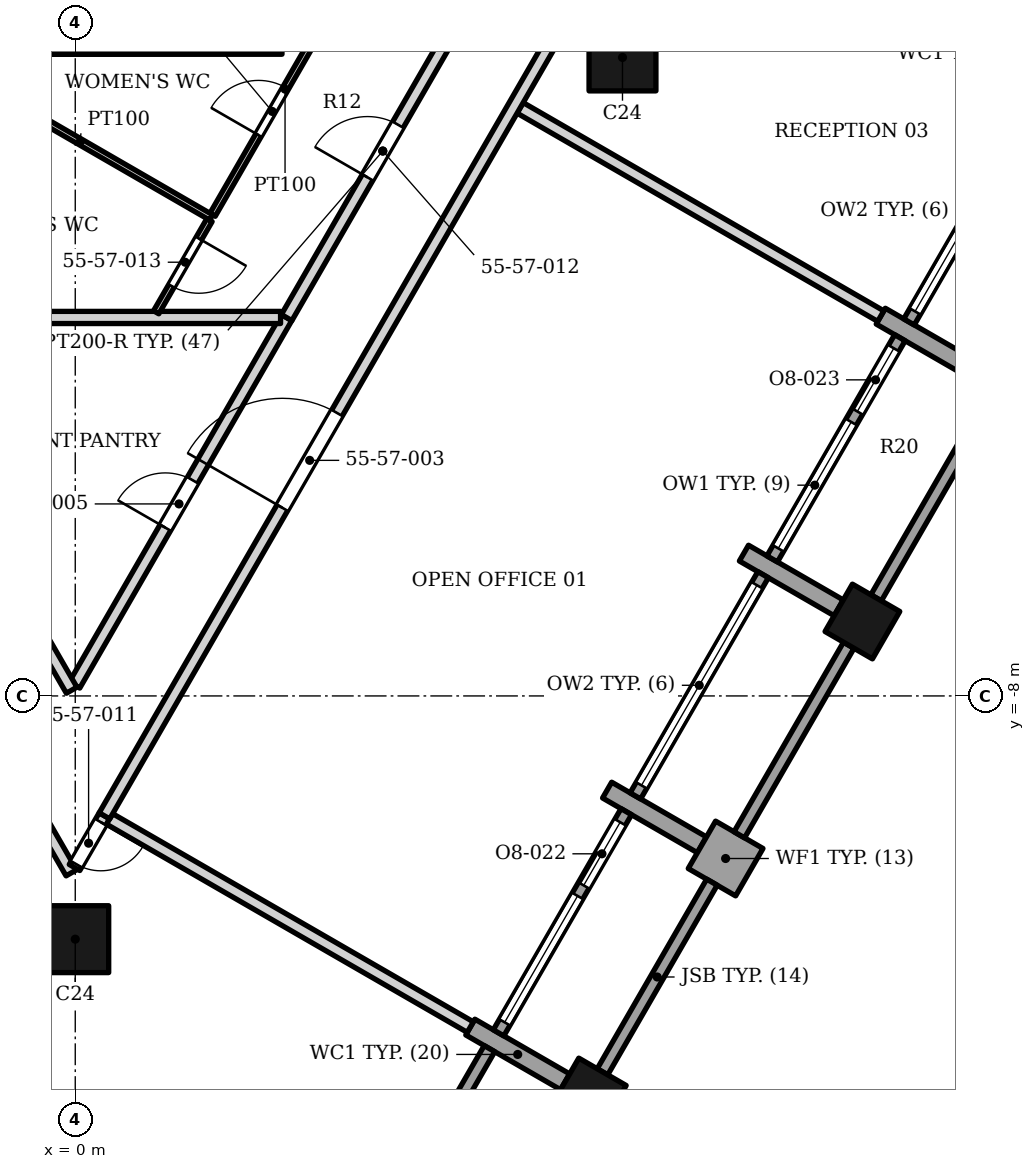
"""IFC4 building model, lengths in metres.
Left out: names, types, materials, properties, quantities, classifications, styles, units other than length and angle.
Written with IfcOpenShell. Run it as: python <this file> out.ifc"""

import sys

from ifc_helpers import new_model, si_unit, direction, frame, frame_2d, origin, origin_2d, place, context, subcontext, project, spatial, rectangle, extrude, element, fill, save


model = new_model("IFC4")
c1 = context("Model", 3, precision=1e-05, world=origin(), true_north=direction((0.0, 1.0)))
c2 = subcontext(c1, "Body", "Model", "MODEL_VIEW")
j1 = project(units=[si_unit("LENGTHUNIT", "METRE"), si_unit("PLANEANGLEUNIT", "RADIAN")], contexts=[c1])
p1 = place(None, origin())
s1 = spatial("IfcSite", under=j1, at=p1, CompositionType="ELEMENT")
p2 = place(p1, origin())
s2 = spatial("IfcBuilding", under=s1, at=p2, CompositionType="ELEMENT")
p3 = place(p2, frame((0.0, 0.0, 231.5)))
s3 = spatial("IfcBuildingStorey", under=s2, at=p3, CompositionType="ELEMENT", Elevation=231.5)
for number, where, z_axis, x_axis in (
    (1, (9.0, 2.5, 0.0), (0.0, 0.0, 1.0), (1.0, 0.0, 0.0)),
    (2, (0.0, -12.0, 0.0), (0.0, 0.0, 1.0), (1.0, 0.0, 0.0)),
):
    element("IfcColumn", number, at=place(p3, frame(where, z_axis=z_axis, x_axis=x_axis)), inside=s3, PredefinedType="COLUMN", context=c2, shape_type="SweptSolid", body=[
        extrude(rectangle(XDim=1.1, YDim=1.1, at=origin_2d()), origin(), (0.0, 0.0, 1.0), 3.9),
    ])
for number, where, z_axis, x_axis in (
    (3, (8.446, -14.571, 0.0), (0.0, 0.0, 1.0), (0.5, 0.866, 0.0)),
    (4, (12.946, -6.776, 0.0), (0.0, 0.0, 1.0), (0.5, 0.866, 0.0)),
):
    element("IfcColumn", number, at=place(p3, frame(where, z_axis=z_axis, x_axis=x_axis)), inside=s3, PredefinedType="COLUMN", context=c2, shape_type="SweptSolid", body=[
        extrude(rectangle(XDim=0.9, YDim=0.9, at=origin_2d()), origin(), (0.0, 0.0, 1.0), 3.9),
    ])
p4 = place(p3, frame((8.056, -14.345, 0.0), z_axis=(0.0, 0.0, 1.0), x_axis=(-0.866047807691, 0.499961193289, 0.0)))
e5 = element("IfcWall", 5, at=p4, inside=s3, PredefinedType="SOLIDWALL", context=c2, shape_type="SweptSolid", body=[
    extrude(rectangle(XDim=1.8, YDim=0.3, at=frame_2d((0.9, 0.0))), origin(), (0.0, 0.0, 1.0), 3.0),
])
p5 = place(p3, frame((10.921, -10.284, 0.0), z_axis=(0.0, 0.0, 1.0), x_axis=(-0.499902469156, -0.866081705922, 0.0)))
e6 = element("IfcWall", 6, at=p5, inside=s3, PredefinedType="SOLIDWALL", context=c2, shape_type="SweptSolid", body=[
    extrude(rectangle(XDim=0.9, YDim=0.9, at=frame_2d((0.45, 0.0))), origin(), (0.0, 0.0, 1.0), 3.0),
])
p6 = place(p3, frame((8.748, -9.548, 0.0), z_axis=(0.0, 0.0, 1.0), x_axis=(0.865989075817, -0.500062916607, 0.0)))
e7 = element("IfcWall", 7, at=p6, inside=s3, PredefinedType="SOLIDWALL", context=c2, shape_type="SweptSolid", body=[
    extrude(rectangle(XDim=1.8, YDim=0.3, at=frame_2d((0.9, 0.0))), origin(), (0.0, 0.0, 1.0), 2.884),
])
p7 = place(p3, frame((12.556, -6.551, 0.0), z_axis=(0.0, 0.0, 1.0), x_axis=(-0.866013897511, 0.50001992892, 0.0)))
e8 = element("IfcWall", 8, at=p7, inside=s3, PredefinedType="SOLIDWALL", context=c2, shape_type="SweptSolid", body=[
    extrude(rectangle(XDim=1.8, YDim=0.3, at=frame_2d((0.9, 0.0))), origin(), (0.0, 0.0, 1.0), 2.884),
])
p8 = place(p3, frame((13.248, -1.754, 0.0), z_axis=(0.0, 0.0, 1.0), x_axis=(0.865989075817, -0.500062916607, 0.0)))
e9 = element("IfcWall", 9, at=p8, inside=s3, PredefinedType="SOLIDWALL", context=c2, shape_type="SweptSolid", body=[
    extrude(rectangle(XDim=1.8, YDim=0.3, at=frame_2d((0.9, 0.0))), origin(), (0.0, 0.0, 1.0), 3.0),
])
p9 = place(p3, frame((4.712, -17.438, 0.0), z_axis=(0.0, 0.0, 1.0), x_axis=(0.500027713859, 0.866009402589, 0.0)))
e10 = element("IfcWall", 10, at=p9, inside=s3, PredefinedType="ELEMENTEDWALL", context=c2, shape_type="SweptSolid", body=[
    extrude(rectangle(XDim=4.2, YDim=0.2, at=frame_2d((2.1, 0.0))), origin(), (0.0, 0.0, 1.0), 3.0),
])
p10 = place(p3, frame((8.671, -14.181, 0.0), z_axis=(0.0, 0.0, 1.0), x_axis=(0.500012057535, 0.866018442252, 0.0)))
e11 = element("IfcWall", 11, at=p10, inside=s3, PredefinedType="SOLIDWALL", context=c2, shape_type="SweptSolid", body=[
    extrude(rectangle(XDim=3.6, YDim=0.2, at=frame_2d((1.8, 0.0))), origin(), (0.0, 0.0, 1.0), 2.95),
])
p11 = place(p3, frame((6.962, -13.541, 0.0), z_axis=(0.0, 0.0, 1.0), x_axis=(0.500027713859, 0.866009402589, 0.0)))
e12 = element("IfcWall", 12, at=p11, inside=s3, PredefinedType="ELEMENTEDWALL", context=c2, shape_type="SweptSolid", body=[
    extrude(rectangle(XDim=4.2, YDim=0.2, at=frame_2d((2.1, 0.0))), origin(), (0.0, 0.0, 1.0), 2.884),
])
p12 = place(p11, frame((0.2, 0.0, 0.45)))
e13 = element("IfcOpeningElement", 13, at=p12, cuts=e12, PredefinedType="OPENING", context=c2, shape_type="SweptSolid", body=[
    extrude(rectangle(XDim=2.4, YDim=2.25, at=frame_2d((1.2, 1.125))), frame((0.0, 0.11, 0.0), z_axis=(0.0, -1.0, 0.0), x_axis=(1.0, 0.0, 0.0)), (0.0, 0.0, 1.0), 0.22),
])
p13 = place(p11, frame((2.8, 0.0, 0.0)))
e14 = element("IfcOpeningElement", 14, at=p13, cuts=e12, PredefinedType="OPENING", context=c2, shape_type="SweptSolid", body=[
    extrude(rectangle(XDim=1.2, YDim=2.7, at=frame_2d((0.6, 1.35))), frame((0.0, 0.11, 0.0), z_axis=(0.0, -1.0, 0.0), x_axis=(1.0, 0.0, 0.0)), (0.0, 0.0, 1.0), 0.22),
])
p14 = place(p3, frame((10.921, -10.284, 0.0), z_axis=(0.0, 0.0, 1.0), x_axis=(0.500012057535, 0.866018442252, 0.0)))
e15 = element("IfcWall", 15, at=p14, inside=s3, PredefinedType="SOLIDWALL", context=c2, shape_type="SweptSolid", body=[
    extrude(rectangle(XDim=3.6, YDim=0.2, at=frame_2d((1.8, 0.0))), origin(), (0.0, 0.0, 1.0), 3.0),
])
p15 = place(p3, frame((9.212, -9.644, 0.0), z_axis=(0.0, 0.0, 1.0), x_axis=(0.500027713859, 0.866009402589, 0.0)))
e16 = element("IfcWall", 16, at=p15, inside=s3, PredefinedType="ELEMENTEDWALL", context=c2, shape_type="SweptSolid", body=[
    extrude(rectangle(XDim=4.2, YDim=0.2, at=frame_2d((2.1, 0.0))), origin(), (0.0, 0.0, 1.0), 2.884),
])
p16 = place(p15, frame((0.2, 0.0, 0.45)))
e17 = element("IfcOpeningElement", 17, at=p16, cuts=e16, PredefinedType="OPENING", context=c2, shape_type="SweptSolid", body=[
    extrude(rectangle(XDim=3.8, YDim=2.25, at=frame_2d((1.9, 1.125))), frame((0.0, 0.11, 0.0), z_axis=(0.0, -1.0, 0.0), x_axis=(1.0, 0.0, 0.0)), (0.0, 0.0, 1.0), 0.22),
])
p17 = place(p3, frame((13.171, -6.387, 0.0), z_axis=(0.0, 0.0, 1.0), x_axis=(0.500012057535, 0.866018442252, 0.0)))
e18 = element("IfcWall", 18, at=p17, inside=s3, PredefinedType="SOLIDWALL", context=c2, shape_type="SweptSolid", body=[
    extrude(rectangle(XDim=3.6, YDim=0.2, at=frame_2d((1.8, 0.0))), origin(), (0.0, 0.0, 1.0), 3.0),
])
p18 = place(p3, frame((11.462, -5.746, 0.0), z_axis=(0.0, 0.0, 1.0), x_axis=(0.500027713859, 0.866009402589, 0.0)))
e19 = element("IfcWall", 19, at=p18, inside=s3, PredefinedType="ELEMENTEDWALL", context=c2, shape_type="SweptSolid", body=[
    extrude(rectangle(XDim=4.2, YDim=0.2, at=frame_2d((2.1, 0.0))), origin(), (0.0, 0.0, 1.0), 2.884),
])
p19 = place(p18, frame((0.2, 0.0, 0.45)))
e20 = element("IfcOpeningElement", 20, at=p19, cuts=e19, PredefinedType="OPENING", context=c2, shape_type="SweptSolid", body=[
    extrude(rectangle(XDim=2.4, YDim=2.25, at=frame_2d((1.2, 1.125))), frame((0.0, 0.11, 0.0), z_axis=(0.0, -1.0, 0.0), x_axis=(1.0, 0.0, 0.0)), (0.0, 0.0, 1.0), 0.22),
])
p20 = place(p18, frame((2.8, 0.0, 0.0)))
e21 = element("IfcOpeningElement", 21, at=p20, cuts=e19, PredefinedType="OPENING", context=c2, shape_type="SweptSolid", body=[
    extrude(rectangle(XDim=1.2, YDim=2.7, at=frame_2d((0.6, 1.35))), frame((0.0, 0.11, 0.0), z_axis=(0.0, -1.0, 0.0), x_axis=(1.0, 0.0, 0.0)), (0.0, 0.0, 1.0), 0.22),
])
p21 = place(p3, frame((13.712, -1.849, 0.0), z_axis=(0.0, 0.0, 1.0), x_axis=(0.500002543286, 0.866023935413, 0.0)))
e22 = element("IfcWall", 22, at=p21, inside=s3, PredefinedType="ELEMENTEDWALL", context=c2, shape_type="SweptSolid", body=[
    extrude(rectangle(XDim=4.2, YDim=0.2, at=frame_2d((2.1, 0.0))), origin(), (0.0, 0.0, 1.0), 3.0),
])
p22 = place(p21, frame((0.2, 0.0, 0.45)))
e23 = element("IfcOpeningElement", 23, at=p22, cuts=e22, PredefinedType="OPENING", context=c2, shape_type="SweptSolid", body=[
    extrude(rectangle(XDim=3.8, YDim=2.25, at=frame_2d((1.9, 1.125))), frame((0.0, 0.11, 0.0), z_axis=(0.0, -1.0, 0.0), x_axis=(1.0, 0.0, 0.0)), (0.0, 0.0, 1.0), 0.22),
])
p23 = place(p3, frame((-8.403, 3.534, 0.0), z_axis=(0.0, 0.0, 1.0), x_axis=(0.499994899308, -0.86602834865, 0.0)))
e24 = element("IfcWall", 24, at=p23, inside=s3, PredefinedType="PARTITIONING", context=c2, shape_type="SweptSolid", body=[
    extrude(rectangle(XDim=16.677, YDim=0.2, at=frame_2d((8.339, 0.0))), origin(), (0.0, 0.0, 1.0), 2.742),
])
p24 = place(p23, frame((6.084, 0.0, 0.0)))
e25 = element("IfcOpeningElement", 25, at=p24, cuts=e24, PredefinedType="OPENING", context=c2, shape_type="SweptSolid", body=[
    extrude(rectangle(XDim=1.8, YDim=2.4, at=frame_2d((0.9, 1.2))), frame((0.0, 0.11, 0.0), z_axis=(0.0, -1.0, 0.0), x_axis=(1.0, 0.0, 0.0)), (0.0, 0.0, 1.0), 0.22),
])
p25 = place(p23, frame((13.285, 0.0, 0.0)))
e26 = element("IfcOpeningElement", 26, at=p25, cuts=e24, PredefinedType="OPENING", context=c2, shape_type="SweptSolid", body=[
    extrude(rectangle(XDim=0.9, YDim=2.1, at=frame_2d((0.45, 1.05))), frame((0.0, 0.11, 0.0), z_axis=(0.0, -1.0, 0.0), x_axis=(1.0, 0.0, 0.0)), (0.0, 0.0, 1.0), 0.22),
])
p26 = place(p23, frame((1.364, 0.0, 0.0)))
e27 = element("IfcOpeningElement", 27, at=p26, cuts=e24, PredefinedType="OPENING", context=c2, shape_type="SweptSolid", body=[
    extrude(rectangle(XDim=0.9, YDim=2.1, at=frame_2d((0.45, 1.05))), frame((0.0, 0.11, 0.0), z_axis=(0.0, -1.0, 0.0), x_axis=(1.0, 0.0, 0.0)), (0.0, 0.0, 1.0), 0.22),
])
p27 = place(p3, frame((-0.012, -10.822, 0.0), z_axis=(0.0, 0.0, 1.0), x_axis=(0.501271486133, 0.865290065348, 0.0)))
e28 = element("IfcWall", 28, at=p27, inside=s3, PredefinedType="PARTITIONING", context=c2, shape_type="SweptSolid", body=[
    extrude(rectangle(XDim=0.982, YDim=0.2, at=frame_2d((0.491, 0.0))), origin(), (0.0, 0.0, 1.0), 2.742),
])
p28 = place(p27, frame((0.062, 0.0, 0.0)))
e29 = element("IfcOpeningElement", 29, at=p28, cuts=e28, PredefinedType="OPENING", context=c2, shape_type="SweptSolid", body=[
    extrude(rectangle(XDim=0.8, YDim=2.1, at=frame_2d((0.4, 1.05))), frame((0.0, 0.11, 0.0), z_axis=(0.0, -1.0, 0.0), x_axis=(1.0, 0.0, 0.0)), (0.0, 0.0, 1.0), 0.22),
])
p29 = place(p3, frame((0.565, -10.022, 0.0), z_axis=(0.0, 0.0, 1.0), x_axis=(0.866127427728, -0.499823247696, 0.0)))
e30 = element("IfcWall", 30, at=p29, inside=s3, PredefinedType="PARTITIONING", context=c2, shape_type="SweptSolid", body=[
    extrude(rectangle(XDim=6.85, YDim=0.2, at=frame_2d((3.425, 0.0))), origin(), (0.0, 0.0, 1.0), 2.742),
])
p30 = place(p3, frame((-0.013, -7.821, 0.0), z_axis=(0.0, 0.0, 1.0), x_axis=(0.499774962009, 0.866155290551, 0.0)))
e31 = element("IfcWall", 31, at=p30, inside=s3, PredefinedType="PARTITIONING", context=c2, shape_type="SweptSolid", body=[
    extrude(rectangle(XDim=6.977, YDim=0.2, at=frame_2d((3.488, 0.0))), origin(), (0.0, 0.0, 1.0), 2.742),
])
p31 = place(p30, frame((2.989, 0.0, 0.0)))
e32 = element("IfcOpeningElement", 32, at=p31, cuts=e31, PredefinedType="OPENING", context=c2, shape_type="SweptSolid", body=[
    extrude(rectangle(XDim=0.9, YDim=2.1, at=frame_2d((0.45, 1.05))), frame((0.0, 0.11, 0.0), z_axis=(0.0, -1.0, 0.0), x_axis=(1.0, 0.0, 0.0)), (0.0, 0.0, 1.0), 0.22),
])
p32 = place(p3, frame((-2.071, -1.776, 0.0), z_axis=(0.0, 0.0, 1.0), x_axis=(1.0, 0.0, 0.0)))
e33 = element("IfcWall", 33, at=p32, inside=s3, PredefinedType="PARTITIONING", context=c2, shape_type="SweptSolid", body=[
    extrude(rectangle(XDim=5.448, YDim=0.2, at=frame_2d((2.724, 0.0))), origin(), (0.0, 0.0, 1.0), 2.742),
])
p33 = place(p3, frame((3.476, -1.778, 0.0), z_axis=(0.0, 0.0, 1.0), x_axis=(0.500016482634, 0.866015887322, 0.0)))
e34 = element("IfcWall", 34, at=p33, inside=s3, PredefinedType="PARTITIONING", context=c2, shape_type="SweptSolid", body=[
    extrude(rectangle(XDim=6.325, YDim=0.2, at=frame_2d((3.163, 0.0))), origin(), (0.0, 0.0, 1.0), 2.742),
])
p34 = place(p33, frame((2.663, 0.0, 0.0)))
e35 = element("IfcOpeningElement", 35, at=p34, cuts=e34, PredefinedType="OPENING", context=c2, shape_type="SweptSolid", body=[
    extrude(rectangle(XDim=1.0, YDim=2.1, at=frame_2d((0.5, 1.05))), frame((0.0, 0.11, 0.0), z_axis=(0.0, -1.0, 0.0), x_axis=(1.0, 0.0, 0.0)), (0.0, 0.0, 1.0), 0.22),
])
p35 = place(p3, frame((7.316, 1.671, 0.0), z_axis=(0.0, 0.0, 1.0), x_axis=(0.866023543838, -0.500003221507, 0.0)))
e36 = element("IfcWall", 36, at=p35, inside=s3, PredefinedType="PARTITIONING", context=c2, shape_type="SweptSolid", body=[
    extrude(rectangle(XDim=6.85, YDim=0.2, at=frame_2d((3.425, 0.0))), origin(), (0.0, 0.0, 1.0), 2.884),
])
p36 = place(p3, frame((1.331, -1.691, 0.0), z_axis=(0.0, 0.0, 1.0), x_axis=(0.500723196883, 0.865607463059, 0.0)))
e37 = element("IfcWall", 37, at=p36, inside=s3, PredefinedType="PARTITIONING", context=c2, shape_type="SweptSolid", body=[
    extrude(rectangle(XDim=1.752, YDim=0.1, at=frame_2d((0.876, 0.0))), origin(), (0.0, 0.0, 1.0), 2.742),
])
p37 = place(p36, frame((0.502, 0.0, 0.0)))
e38 = element("IfcOpeningElement", 38, at=p37, cuts=e37, PredefinedType="OPENING", context=c2, shape_type="SweptSolid", body=[
    extrude(rectangle(XDim=0.9, YDim=2.1, at=frame_2d((0.45, 1.05))), frame((0.0, 0.06, 0.0), z_axis=(0.0, -1.0, 0.0), x_axis=(1.0, 0.0, 0.0)), (0.0, 0.0, 1.0), 0.12),
])
p38 = place(p3, frame((2.258, -0.087, 0.0), z_axis=(0.0, 0.0, 1.0), x_axis=(0.499684056676, 0.866207736922, 0.0)))
e39 = element("IfcWall", 39, at=p38, inside=s3, PredefinedType="PARTITIONING", context=c2, shape_type="SweptSolid", body=[
    extrude(rectangle(XDim=4.771, YDim=0.1, at=frame_2d((2.385, 0.0))), origin(), (0.0, 0.0, 1.0), 2.742),
])
p39 = place(p38, frame((1.513, 0.0, 0.0)))
e40 = element("IfcOpeningElement", 40, at=p39, cuts=e39, PredefinedType="OPENING", context=c2, shape_type="SweptSolid", body=[
    extrude(rectangle(XDim=0.9, YDim=2.1, at=frame_2d((0.45, 1.05))), frame((0.0, 0.06, 0.0), z_axis=(0.0, -1.0, 0.0), x_axis=(1.0, 0.0, 0.0)), (0.0, 0.0, 1.0), 0.12),
])
p40 = place(p3, frame((-2.073, 2.357, 0.0), z_axis=(0.0, 0.0, 1.0), x_axis=(0.865852787501, -0.500298861059, 0.0)))
e41 = element("IfcWall", 41, at=p40, inside=s3, PredefinedType="PARTITIONING", context=c2, shape_type="SweptSolid", body=[
    extrude(rectangle(XDim=4.974, YDim=0.1, at=frame_2d((2.487, 0.0))), origin(), (0.0, 0.0, 1.0), 2.742),
])
p41 = place(p3, frame((-2.071, 2.651, 0.0), z_axis=(0.0, 0.0, 1.0), x_axis=(0.99999995122, 0.0003123466, 0.0)))
e42 = element("IfcWall", 42, at=p41, inside=s3, PredefinedType="PARTITIONING", context=c2, shape_type="SweptSolid", body=[
    extrude(rectangle(XDim=5.471, YDim=0.2, at=frame_2d((2.736, 0.0))), origin(), (0.0, 0.0, 1.0), 3.73),
])
p42 = place(p3, frame((-6.764, 3.7, 0.0), z_axis=(0.0, 0.0, 1.0), x_axis=(0.500260603275, -0.865874892124, 0.0)))
e43 = element("IfcWall", 43, at=p42, inside=s3, PredefinedType="PARTITIONING", context=c2, shape_type="SweptSolid", body=[
    extrude(rectangle(XDim=13.403, YDim=0.2, at=frame_2d((6.702, 0.0))), origin(), (0.0, 0.0, 1.0), 2.742),
])
p43 = place(p42, frame((2.663, 0.0, 0.0)))
e44 = element("IfcOpeningElement", 44, at=p43, cuts=e43, PredefinedType="OPENING", context=c2, shape_type="SweptSolid", body=[
    extrude(rectangle(XDim=1.0, YDim=2.1, at=frame_2d((0.5, 1.05))), frame((0.0, 0.11, 0.0), z_axis=(0.0, -1.0, 0.0), x_axis=(1.0, 0.0, 0.0)), (0.0, 0.0, 1.0), 0.22),
])
p44 = place(p3, frame((0.48, -9.972, 0.0), z_axis=(0.0, 0.0, 1.0), x_axis=(0.499998248741, 0.866026414872, 0.0)))
e45 = element("IfcWall", 45, at=p44, inside=s3, PredefinedType="PARTITIONING", context=c2, shape_type="SweptSolid", body=[
    extrude(rectangle(XDim=15.785, YDim=0.2, at=frame_2d((7.893, 0.0))), origin(), (0.0, 0.0, 1.0), 2.742),
])
p45 = place(p44, frame((5.85, 0.0, 0.0)))
e46 = element("IfcOpeningElement", 46, at=p45, cuts=e45, PredefinedType="OPENING", context=c2, shape_type="SweptSolid", body=[
    extrude(rectangle(XDim=1.8, YDim=2.4, at=frame_2d((0.9, 1.2))), frame((0.0, 0.11, 0.0), z_axis=(0.0, -1.0, 0.0), x_axis=(1.0, 0.0, 0.0)), (0.0, 0.0, 1.0), 0.22),
])
p46 = place(p12, origin())
e47 = element("IfcWindow", 47, at=p46, inside=s3, PartitioningType="SINGLE_PANEL", PredefinedType="WINDOW", context=c2, shape_type="SweptSolid", body=[
    extrude(rectangle(XDim=2.4, YDim=2.25, at=frame_2d((1.2, 1.125))), frame((0.0, 0.03, 0.0), z_axis=(0.0, -1.0, 0.0), x_axis=(1.0, 0.0, 0.0)), (0.0, 0.0, 1.0), 0.06),
])
fill(e13, e47)
p47 = place(p13, origin())
e48 = element("IfcDoor", 48, at=p47, inside=s3, OperationType="SINGLE_SWING_LEFT", PredefinedType="DOOR", context=c2, shape_type="SweptSolid", body=[
    extrude(rectangle(XDim=1.2, YDim=2.7, at=frame_2d((0.6, 1.35))), frame((0.0, 0.025, 0.0), z_axis=(0.0, -1.0, 0.0), x_axis=(1.0, 0.0, 0.0)), (0.0, 0.0, 1.0), 0.05),
])
fill(e14, e48)
p48 = place(p16, origin())
e49 = element("IfcWindow", 49, at=p48, inside=s3, PartitioningType="SINGLE_PANEL", PredefinedType="WINDOW", context=c2, shape_type="SweptSolid", body=[
    extrude(rectangle(XDim=3.8, YDim=2.25, at=frame_2d((1.9, 1.125))), frame((0.0, 0.03, 0.0), z_axis=(0.0, -1.0, 0.0), x_axis=(1.0, 0.0, 0.0)), (0.0, 0.0, 1.0), 0.06),
])
fill(e17, e49)
p49 = place(p19, origin())
e50 = element("IfcWindow", 50, at=p49, inside=s3, PartitioningType="SINGLE_PANEL", PredefinedType="WINDOW", context=c2, shape_type="SweptSolid", body=[
    extrude(rectangle(XDim=2.4, YDim=2.25, at=frame_2d((1.2, 1.125))), frame((0.0, 0.03, 0.0), z_axis=(0.0, -1.0, 0.0), x_axis=(1.0, 0.0, 0.0)), (0.0, 0.0, 1.0), 0.06),
])
fill(e20, e50)
p50 = place(p20, origin())
e51 = element("IfcDoor", 51, at=p50, inside=s3, OperationType="SINGLE_SWING_LEFT", PredefinedType="DOOR", context=c2, shape_type="SweptSolid", body=[
    extrude(rectangle(XDim=1.2, YDim=2.7, at=frame_2d((0.6, 1.35))), frame((0.0, 0.025, 0.0), z_axis=(0.0, -1.0, 0.0), x_axis=(1.0, 0.0, 0.0)), (0.0, 0.0, 1.0), 0.05),
])
fill(e21, e51)
p51 = place(p22, origin())
e52 = element("IfcWindow", 52, at=p51, inside=s3, PartitioningType="SINGLE_PANEL", PredefinedType="WINDOW", context=c2, shape_type="SweptSolid", body=[
    extrude(rectangle(XDim=3.8, YDim=2.25, at=frame_2d((1.9, 1.125))), frame((0.0, 0.03, 0.0), z_axis=(0.0, -1.0, 0.0), x_axis=(1.0, 0.0, 0.0)), (0.0, 0.0, 1.0), 0.06),
])
fill(e23, e52)
p52 = place(p45, origin())
e53 = element("IfcDoor", 53, at=p52, inside=s3, OperationType="DOUBLE_DOOR_SINGLE_SWING", PredefinedType="DOOR", context=c2, shape_type="SweptSolid", body=[
    extrude(rectangle(XDim=1.8, YDim=2.4, at=frame_2d((0.9, 1.2))), frame((0.0, 0.025, 0.0), z_axis=(0.0, -1.0, 0.0), x_axis=(1.0, 0.0, 0.0)), (0.0, 0.0, 1.0), 0.05),
])
fill(e46, e53)
p53 = place(p31, origin())
e54 = element("IfcDoor", 54, at=p53, inside=s3, OperationType="SINGLE_SWING_LEFT", PredefinedType="DOOR", context=c2, shape_type="SweptSolid", body=[
    extrude(rectangle(XDim=0.9, YDim=2.1, at=frame_2d((0.45, 1.05))), frame((0.0, 0.025, 0.0), z_axis=(0.0, -1.0, 0.0), x_axis=(1.0, 0.0, 0.0)), (0.0, 0.0, 1.0), 0.05),
])
fill(e32, e54)
p54 = place(p28, origin())
e55 = element("IfcDoor", 55, at=p54, inside=s3, OperationType="SINGLE_SWING_RIGHT", PredefinedType="DOOR", context=c2, shape_type="SweptSolid", body=[
    extrude(rectangle(XDim=0.8, YDim=2.1, at=frame_2d((0.4, 1.05))), frame((0.0, 0.025, 0.0), z_axis=(0.0, -1.0, 0.0), x_axis=(1.0, 0.0, 0.0)), (0.0, 0.0, 1.0), 0.05),
])
fill(e29, e55)
p55 = place(p34, origin())
e56 = element("IfcDoor", 56, at=p55, inside=s3, OperationType="SINGLE_SWING_LEFT", PredefinedType="DOOR", context=c2, shape_type="SweptSolid", body=[
    extrude(rectangle(XDim=1.0, YDim=2.1, at=frame_2d((0.5, 1.05))), frame((0.0, 0.025, 0.0), z_axis=(0.0, -1.0, 0.0), x_axis=(1.0, 0.0, 0.0)), (0.0, 0.0, 1.0), 0.05),
])
fill(e35, e56)
p56 = place(p37, origin())
e57 = element("IfcDoor", 57, at=p56, inside=s3, OperationType="SINGLE_SWING_RIGHT", PredefinedType="DOOR", context=c2, shape_type="SweptSolid", body=[
    extrude(rectangle(XDim=0.9, YDim=2.1, at=frame_2d((0.45, 1.05))), frame((0.0, 0.025, 0.0), z_axis=(0.0, -1.0, 0.0), x_axis=(1.0, 0.0, 0.0)), (0.0, 0.0, 1.0), 0.05),
])
fill(e38, e57)
p57 = place(p39, origin())
e58 = element("IfcDoor", 58, at=p57, inside=s3, OperationType="SINGLE_SWING_LEFT", PredefinedType="DOOR", context=c2, shape_type="SweptSolid", body=[
    extrude(rectangle(XDim=0.9, YDim=2.1, at=frame_2d((0.45, 1.05))), frame((0.0, 0.025, 0.0), z_axis=(0.0, -1.0, 0.0), x_axis=(1.0, 0.0, 0.0)), (0.0, 0.0, 1.0), 0.05),
])
fill(e40, e58)
save(model, sys.argv[1])
